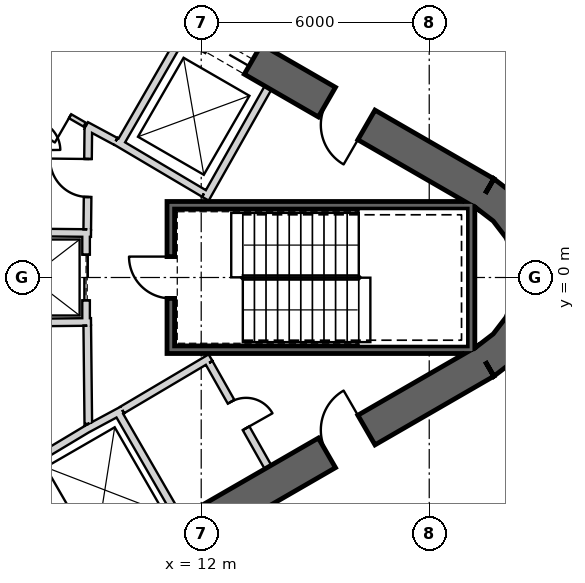
"""IFC4 building model, lengths in metres.
Left out: names, types, materials, properties, quantities, classifications, styles, units other than length and angle.
Written with IfcOpenShell. Run it as: python <this file> out.ifc"""

import sys

from ifc_helpers import new_model, si_unit, direction, frame, frame_2d, origin, place, context, subcontext, project, spatial, polyline, rectangle, outline, extrude, element, fill, save


model = new_model("IFC4")
c1 = context("Model", 3, precision=1e-05, world=origin(), true_north=direction((0.0, 1.0)))
c2 = subcontext(c1, "Body", "Model", "MODEL_VIEW")
j1 = project(units=[si_unit("LENGTHUNIT", "METRE"), si_unit("PLANEANGLEUNIT", "RADIAN")], contexts=[c1])
p1 = place(None, origin())
s1 = spatial("IfcSite", under=j1, at=p1, CompositionType="ELEMENT")
p2 = place(p1, origin())
s2 = spatial("IfcBuilding", under=s1, at=p2, CompositionType="ELEMENT")
p3 = place(p2, frame((0.0, 0.0, 241.2)))
s3 = spatial("IfcBuildingStorey", under=s2, at=p3, CompositionType="ELEMENT", Elevation=241.2)
p4 = place(p3, frame((19.475, 2.208, 0.0), z_axis=(0.0, 0.0, 1.0), x_axis=(-0.866028369851, 0.499994862586, 0.0)))
e1 = element("IfcWall", 1, at=p4, inside=s3, PredefinedType="SHEAR", context=c2, shape_type="SweptSolid", body=[
    extrude(rectangle(XDim=31.523, YDim=0.9, at=frame_2d((15.762, 0.0))), origin(), (0.0, 0.0, 1.0), 4.0),
])
p5 = place(p4, frame((7.062, 0.0, 0.0)))
e2 = element("IfcOpeningElement", 2, at=p5, cuts=e1, PredefinedType="OPENING", context=c2, shape_type="SweptSolid", body=[
    extrude(rectangle(XDim=1.2, YDim=2.4, at=frame_2d((0.6, 1.2))), frame((0.0, 0.46, 0.0), z_axis=(0.0, -1.0, 0.0), x_axis=(1.0, 0.0, 0.0)), (0.0, 0.0, 1.0), 0.92),
])
p6 = place(p4, frame((3.612, 0.0, 0.0)))
e3 = element("IfcOpeningElement", 3, at=p6, cuts=e1, PredefinedType="OPENING", context=c2, shape_type="SweptSolid", body=[
    extrude(rectangle(XDim=1.2, YDim=2.4, at=frame_2d((0.6, 1.2))), frame((0.0, 0.46, 0.0), z_axis=(0.0, -1.0, 0.0), x_axis=(1.0, 0.0, 0.0)), (0.0, 0.0, 1.0), 0.92),
])
p7 = place(p4, frame((26.712, 0.0, 0.0)))
e4 = element("IfcOpeningElement", 4, at=p7, cuts=e1, PredefinedType="OPENING", context=c2, shape_type="SweptSolid", body=[
    extrude(rectangle(XDim=1.2, YDim=2.4, at=frame_2d((0.6, 1.2))), frame((0.0, 0.46, 0.0), z_axis=(0.0, -1.0, 0.0), x_axis=(1.0, 0.0, 0.0)), (0.0, 0.0, 1.0), 0.92),
])
p8 = place(p3, frame((-7.825, -17.97, 0.0), z_axis=(0.0, 0.0, 1.0), x_axis=(0.866028369851, 0.499994862586, 0.0)))
e5 = element("IfcWall", 5, at=p8, inside=s3, PredefinedType="SHEAR", context=c2, shape_type="SweptSolid", body=[
    extrude(rectangle(XDim=31.523, YDim=0.9, at=frame_2d((15.762, 0.0))), origin(), (0.0, 0.0, 1.0), 4.0),
])
p9 = place(p8, frame((7.062, 0.0, 0.0)))
e6 = element("IfcOpeningElement", 6, at=p9, cuts=e5, PredefinedType="OPENING", context=c2, shape_type="SweptSolid", body=[
    extrude(rectangle(XDim=1.2, YDim=2.4, at=frame_2d((0.6, 1.2))), frame((0.0, 0.46, 0.0), z_axis=(0.0, -1.0, 0.0), x_axis=(1.0, 0.0, 0.0)), (0.0, 0.0, 1.0), 0.92),
])
p10 = place(p8, frame((9.762, 0.0, 0.0)))
e7 = element("IfcOpeningElement", 7, at=p10, cuts=e5, PredefinedType="OPENING", context=c2, shape_type="SweptSolid", body=[
    extrude(rectangle(XDim=1.2, YDim=2.4, at=frame_2d((0.6, 1.2))), frame((0.0, 0.46, 0.0), z_axis=(0.0, -1.0, 0.0), x_axis=(1.0, 0.0, 0.0)), (0.0, 0.0, 1.0), 0.92),
])
p11 = place(p8, frame((12.462, 0.0, 0.0)))
e8 = element("IfcOpeningElement", 8, at=p11, cuts=e5, PredefinedType="OPENING", context=c2, shape_type="SweptSolid", body=[
    extrude(rectangle(XDim=1.2, YDim=2.4, at=frame_2d((0.6, 1.2))), frame((0.0, 0.46, 0.0), z_axis=(0.0, -1.0, 0.0), x_axis=(1.0, 0.0, 0.0)), (0.0, 0.0, 1.0), 0.92),
])
p12 = place(p8, frame((15.162, 0.0, 0.0)))
e9 = element("IfcOpeningElement", 9, at=p12, cuts=e5, PredefinedType="OPENING", context=c2, shape_type="SweptSolid", body=[
    extrude(rectangle(XDim=1.2, YDim=2.4, at=frame_2d((0.6, 1.2))), frame((0.0, 0.46, 0.0), z_axis=(0.0, -1.0, 0.0), x_axis=(1.0, 0.0, 0.0)), (0.0, 0.0, 1.0), 0.92),
])
p13 = place(p8, frame((17.862, 0.0, 0.0)))
e10 = element("IfcOpeningElement", 10, at=p13, cuts=e5, PredefinedType="OPENING", context=c2, shape_type="SweptSolid", body=[
    extrude(rectangle(XDim=1.2, YDim=2.4, at=frame_2d((0.6, 1.2))), frame((0.0, 0.46, 0.0), z_axis=(0.0, -1.0, 0.0), x_axis=(1.0, 0.0, 0.0)), (0.0, 0.0, 1.0), 0.92),
])
p14 = place(p8, frame((20.562, 0.0, 0.0)))
e11 = element("IfcOpeningElement", 11, at=p14, cuts=e5, PredefinedType="OPENING", context=c2, shape_type="SweptSolid", body=[
    extrude(rectangle(XDim=1.2, YDim=2.4, at=frame_2d((0.6, 1.2))), frame((0.0, 0.46, 0.0), z_axis=(0.0, -1.0, 0.0), x_axis=(1.0, 0.0, 0.0)), (0.0, 0.0, 1.0), 0.92),
])
p15 = place(p8, frame((26.712, 0.0, 0.0)))
e12 = element("IfcOpeningElement", 12, at=p15, cuts=e5, PredefinedType="OPENING", context=c2, shape_type="SweptSolid", body=[
    extrude(rectangle(XDim=1.2, YDim=2.4, at=frame_2d((0.6, 1.2))), frame((0.0, 0.46, 0.0), z_axis=(0.0, -1.0, 0.0), x_axis=(1.0, 0.0, 0.0)), (0.0, 0.0, 1.0), 0.92),
])
p16 = place(p8, frame((3.612, 0.0, 0.0)))
e13 = element("IfcOpeningElement", 13, at=p16, cuts=e5, PredefinedType="OPENING", context=c2, shape_type="SweptSolid", body=[
    extrude(rectangle(XDim=1.2, YDim=2.4, at=frame_2d((0.6, 1.2))), frame((0.0, 0.46, 0.0), z_axis=(0.0, -1.0, 0.0), x_axis=(1.0, 0.0, 0.0)), (0.0, 0.0, 1.0), 0.92),
])
p17 = place(p3, origin())
e14 = element("IfcWall", 14, at=p17, inside=s3, PredefinedType="SHEAR", context=c2, shape_type="SweptSolid", body=[
    extrude(outline(polyline([(19.7, -2.598), (20.321, -2.121), (20.798, -1.5), (21.098, -0.777), (21.2, 0.0), (21.098, 0.777), (20.798, 1.5), (20.321, 2.121), (19.7, 2.598), (19.25, 1.819), (19.685, 1.485), (20.019, 1.05), (20.229, 0.543), (20.3, 0.0), (20.229, -0.543), (20.019, -1.05), (19.685, -1.485), (19.25, -1.819), (19.7, -2.598)])), origin(), (0.0, 0.0, 1.0), 4.0),
])
p18 = place(p3, frame((9.847, 3.495, 0.0), z_axis=(0.0, 0.0, 1.0), x_axis=(0.499984717929, 0.866034226713, 0.0)))
e15 = element("IfcWall", 15, at=p18, inside=s3, PredefinedType="PLUMBINGWALL", context=c2, shape_type="SweptSolid", body=[
    extrude(rectangle(XDim=3.25, YDim=0.2, at=frame_2d((1.625, 0.0))), origin(), (0.0, 0.0, 1.0), 3.7),
])
p19 = place(p3, frame((12.11, 2.073, 0.0), z_axis=(0.0, 0.0, 1.0), x_axis=(0.49196600604, 0.870614408852, 0.0)))
e16 = element("IfcWall", 16, at=p19, inside=s3, PredefinedType="PLUMBINGWALL", context=c2, shape_type="SweptSolid", body=[
    extrude(rectangle(XDim=3.35, YDim=0.2, at=frame_2d((1.675, 0.0))), origin(), (0.0, 0.0, 1.0), 3.7),
])
p20 = place(p3, frame((12.073, 2.211, 0.0), z_axis=(0.0, 0.0, 1.0), x_axis=(-0.860414880418, 0.509594185166, 0.0)))
e17 = element("IfcWall", 17, at=p20, inside=s3, PredefinedType="PLUMBINGWALL", context=c2, shape_type="SweptSolid", body=[
    extrude(rectangle(XDim=2.7, YDim=0.2, at=frame_2d((1.35, 0.0))), origin(), (0.0, 0.0, 1.0), 3.7),
])
p21 = place(p3, frame((9.795, -3.525, 0.0), z_axis=(0.0, 0.0, 1.0), x_axis=(0.499984717929, -0.866034226713, 0.0)))
e18 = element("IfcWall", 18, at=p21, inside=s3, PredefinedType="PLUMBINGWALL", context=c2, shape_type="SweptSolid", body=[
    extrude(rectangle(XDim=3.25, YDim=0.2, at=frame_2d((1.625, 0.0))), origin(), (0.0, 0.0, 1.0), 3.7),
])
p22 = place(p3, frame((8.974, -3.999, 0.0), z_axis=(0.0, 0.0, 1.0), x_axis=(0.880907015104, 0.473289373154, 0.0)))
e19 = element("IfcWall", 19, at=p22, inside=s3, PredefinedType="PLUMBINGWALL", context=c2, shape_type="SweptSolid", body=[
    extrude(rectangle(XDim=1.078, YDim=0.2, at=frame_2d((0.539, 0.0))), origin(), (0.0, 0.0, 1.0), 3.7),
])
p23 = place(p3, frame((7.497, -4.886, 0.0), z_axis=(0.0, 0.0, 1.0), x_axis=(0.857516281273, 0.51445682749, 0.0)))
e20 = element("IfcWall", 20, at=p23, inside=s3, PredefinedType="PLUMBINGWALL", context=c2, shape_type="SweptSolid", body=[
    extrude(rectangle(XDim=1.845, YDim=0.2, at=frame_2d((0.922, 0.0))), origin(), (0.0, 0.0, 1.0), 3.7),
])
p24 = place(p3, frame((19.2, 1.9, -0.3), z_axis=(0.0, 0.0, 1.0), x_axis=(-1.0, 0.0, 0.0)))
e21 = element("IfcWall", 21, at=p24, inside=s3, PredefinedType="SHEAR", context=c2, shape_type="SweptSolid", body=[
    extrude(rectangle(XDim=8.1, YDim=0.2, at=frame_2d((4.05, 0.0))), origin(), (0.0, 0.0, 1.0), 4.0),
])
p25 = place(p3, frame((19.1, -2.0, -0.3), z_axis=(0.0, 0.0, 1.0), x_axis=(0.0, 1.0, 0.0)))
e22 = element("IfcWall", 22, at=p25, inside=s3, PredefinedType="SHEAR", context=c2, shape_type="SweptSolid", body=[
    extrude(rectangle(XDim=3.8, YDim=0.2, at=frame_2d((1.9, 0.0))), origin(), (0.0, 0.0, 1.0), 4.0),
])
p26 = place(p3, frame((11.1, -1.9, -0.3), z_axis=(0.0, 0.0, 1.0), x_axis=(1.0, 0.0, 0.0)))
e23 = element("IfcWall", 23, at=p26, inside=s3, PredefinedType="SHEAR", context=c2, shape_type="SweptSolid", body=[
    extrude(rectangle(XDim=7.9, YDim=0.2, at=frame_2d((3.95, 0.0))), origin(), (0.0, 0.0, 1.0), 4.0),
])
p27 = place(p3, frame((11.2, -1.8, -0.3), z_axis=(0.0, 0.0, 1.0), x_axis=(0.0, 1.0, 0.0)))
e24 = element("IfcWall", 24, at=p27, inside=s3, PredefinedType="SHEAR", context=c2, shape_type="SweptSolid", body=[
    extrude(rectangle(XDim=3.6, YDim=0.2, at=frame_2d((1.8, 0.0))), origin(), (0.0, 0.0, 1.0), 4.0),
])
p28 = place(p27, frame((1.25, 0.0, 0.3)))
e25 = element("IfcOpeningElement", 25, at=p28, cuts=e24, PredefinedType="OPENING", context=c2, shape_type="SweptSolid", body=[
    extrude(rectangle(XDim=1.1, YDim=2.1, at=frame_2d((0.55, 1.05))), frame((0.0, 0.11, 0.0), z_axis=(0.0, -1.0, 0.0), x_axis=(1.0, 0.0, 0.0)), (0.0, 0.0, 1.0), 0.22),
])
p29 = place(p3, frame((8.97, 1.2, 0.0), z_axis=(0.0, 0.0, 1.0), x_axis=(0.0, -1.0, 0.0)))
e26 = element("IfcWall", 26, at=p29, inside=s3, PredefinedType="PLUMBINGWALL", context=c2, shape_type="SweptSolid", body=[
    extrude(rectangle(XDim=2.4, YDim=0.2, at=frame_2d((1.2, 0.0))), origin(), (0.0, 0.0, 1.0), 3.7),
])
p30 = place(p29, frame((0.6, 0.0, 0.0)))
e27 = element("IfcOpeningElement", 27, at=p30, cuts=e26, PredefinedType="OPENING", context=c2, shape_type="SweptSolid", body=[
    extrude(rectangle(XDim=1.2, YDim=2.4, at=frame_2d((0.6, 1.2))), frame((0.0, 0.11, 0.0), z_axis=(0.0, -1.0, 0.0), x_axis=(1.0, 0.0, 0.0)), (0.0, 0.0, 1.0), 0.22),
])
p31 = place(p3, frame((9.1, -1.169, 0.0), z_axis=(0.0, 0.0, 1.0), x_axis=(-0.999949988, -0.010001074852, 0.0)))
e28 = element("IfcWall", 28, at=p31, inside=s3, PredefinedType="PLUMBINGWALL", context=c2, shape_type="SweptSolid", body=[
    extrude(rectangle(XDim=3.1, YDim=0.2, at=frame_2d((1.55, 0.0))), origin(), (0.0, 0.0, 1.0), 3.7),
])
p32 = place(p3, frame((9.1, 1.169, 0.0), z_axis=(0.0, 0.0, 1.0), x_axis=(-0.99994990606, 0.010009264196, 0.0)))
e29 = element("IfcWall", 29, at=p32, inside=s3, PredefinedType="PLUMBINGWALL", context=c2, shape_type="SweptSolid", body=[
    extrude(rectangle(XDim=3.0, YDim=0.2, at=frame_2d((1.5, 0.0))), origin(), (0.0, 0.0, 1.0), 3.7),
])
p33 = place(p3, frame((8.974, 3.999, 0.0), z_axis=(0.0, 0.0, 1.0), x_axis=(0.880917147855, -0.473270513147, 0.0)))
e30 = element("IfcWall", 30, at=p33, inside=s3, PredefinedType="PARTITIONING", context=c2, shape_type="SweptSolid", body=[
    extrude(rectangle(XDim=0.878, YDim=0.2, at=frame_2d((0.439, 0.0))), origin(), (0.0, 0.0, 1.0), 3.7),
])
p34 = place(p3, frame((7.457, 4.875, 0.0), z_axis=(0.0, 0.0, 1.0), x_axis=(0.866027945518, -0.499995597562, 0.0)))
e31 = element("IfcWall", 31, at=p34, inside=s3, PredefinedType="PARTITIONING", context=c2, shape_type="SweptSolid", body=[
    extrude(rectangle(XDim=1.702, YDim=0.12, at=frame_2d((0.851, 0.0))), origin(), (0.0, 0.0, 1.0), 3.7),
])
p35 = place(p34, frame((0.461, 0.0, 0.0)))
e32 = element("IfcOpeningElement", 32, at=p35, cuts=e31, PredefinedType="OPENING", context=c2, shape_type="SweptSolid", body=[
    extrude(rectangle(XDim=0.8, YDim=2.1, at=frame_2d((0.4, 1.05))), frame((0.0, 0.07, 0.0), z_axis=(0.0, -1.0, 0.0), x_axis=(1.0, 0.0, 0.0)), (0.0, 0.0, 1.0), 0.14),
])
p36 = place(p3, frame((12.245, -2.109, 0.0), z_axis=(0.0, 0.0, 1.0), x_axis=(-0.860414880418, -0.509594185166, 0.0)))
e33 = element("IfcWall", 33, at=p36, inside=s3, PredefinedType="PARTITIONING", context=c2, shape_type="SweptSolid", body=[
    extrude(rectangle(XDim=2.7, YDim=0.2, at=frame_2d((1.35, 0.0))), origin(), (0.0, 0.0, 1.0), 3.7),
])
p37 = place(p3, frame((13.758, -4.99, 0.0), z_axis=(0.0, 0.0, 1.0), x_axis=(-0.491993409184, 0.87059892334, 0.0)))
e34 = element("IfcWall", 34, at=p37, inside=s3, PredefinedType="PARTITIONING", context=c2, shape_type="SweptSolid", body=[
    extrude(rectangle(XDim=3.15, YDim=0.2, at=frame_2d((1.575, 0.0))), origin(), (0.0, 0.0, 1.0), 3.7),
])
p38 = place(p37, frame((1.175, 0.0, 0.0)))
e35 = element("IfcOpeningElement", 35, at=p38, cuts=e34, PredefinedType="OPENING", context=c2, shape_type="SweptSolid", body=[
    extrude(rectangle(XDim=0.8, YDim=2.1, at=frame_2d((0.4, 1.05))), frame((0.0, 0.11, 0.0), z_axis=(0.0, -1.0, 0.0), x_axis=(1.0, 0.0, 0.0)), (0.0, 0.0, 1.0), 0.22),
])
p39 = place(p3, frame((9.029, -3.851, 0.0), z_axis=(0.0, 0.0, 1.0), x_axis=(-0.010784614026, 0.999941844359, 0.0)))
e36 = element("IfcWall", 36, at=p39, inside=s3, PredefinedType="PARTITIONING", context=c2, shape_type="SweptSolid", body=[
    extrude(rectangle(XDim=2.581, YDim=0.2, at=frame_2d((1.291, 0.0))), origin(), (0.0, 0.0, 1.0), 3.7),
])
p40 = place(p3, frame((9.001, 1.27, 0.0), z_axis=(0.0, 0.0, 1.0), x_axis=(0.010723968736, 0.999942496594, 0.0)))
e37 = element("IfcWall", 37, at=p40, inside=s3, PredefinedType="PARTITIONING", context=c2, shape_type="SweptSolid", body=[
    extrude(rectangle(XDim=2.709, YDim=0.2, at=frame_2d((1.354, 0.0))), origin(), (0.0, 0.0, 1.0), 3.7),
])
p41 = place(p40, frame((0.848, 0.0, 0.0)))
e38 = element("IfcOpeningElement", 38, at=p41, cuts=e37, PredefinedType="OPENING", context=c2, shape_type="SweptSolid", body=[
    extrude(rectangle(XDim=1.0, YDim=2.1, at=frame_2d((0.5, 1.05))), frame((0.0, 0.11, 0.0), z_axis=(0.0, -1.0, 0.0), x_axis=(1.0, 0.0, 0.0)), (0.0, 0.0, 1.0), 0.22),
])
p42 = place(p3, frame((21.229, 5.988, 0.0), z_axis=(0.0, 0.0, 1.0), x_axis=(-0.866024383922, 0.50000176645, 0.0)))
e39 = element("IfcWall", 39, at=p42, inside=s3, PredefinedType="PARTITIONING", context=c2, shape_type="SweptSolid", body=[
    extrude(rectangle(XDim=5.221, YDim=0.12, at=frame_2d((2.61, 0.0))), origin(), (0.0, 0.0, 1.0), 2.98),
])
p43 = place(p42, frame((2.16, 0.0, 0.0)))
e40 = element("IfcOpeningElement", 40, at=p43, cuts=e39, PredefinedType="OPENING", context=c2, shape_type="SweptSolid", body=[
    extrude(rectangle(XDim=0.9, YDim=2.1, at=frame_2d((0.45, 1.05))), frame((0.0, 0.07, 0.0), z_axis=(0.0, -1.0, 0.0), x_axis=(1.0, 0.0, 0.0)), (0.0, 0.0, 1.0), 0.14),
])
p44 = place(p28, origin())
e41 = element("IfcDoor", 41, at=p44, inside=s3, OperationType="SINGLE_SWING_RIGHT", PredefinedType="USERDEFINED", context=c2, shape_type="SweptSolid", body=[
    extrude(rectangle(XDim=1.1, YDim=2.1, at=frame_2d((0.55, 1.05))), frame((0.0, 0.025, 0.0), z_axis=(0.0, -1.0, 0.0), x_axis=(1.0, 0.0, 0.0)), (0.0, 0.0, 1.0), 0.05),
])
fill(e25, e41)
p45 = place(p41, origin())
e42 = element("IfcDoor", 42, at=p45, inside=s3, OperationType="SINGLE_SWING_LEFT", PredefinedType="USERDEFINED", context=c2, shape_type="SweptSolid", body=[
    extrude(rectangle(XDim=1.0, YDim=2.1, at=frame_2d((0.5, 1.05))), frame((0.0, 0.025, 0.0), z_axis=(0.0, -1.0, 0.0), x_axis=(1.0, 0.0, 0.0)), (0.0, 0.0, 1.0), 0.05),
])
fill(e38, e42)
p46 = place(p30, origin())
e43 = element("IfcDoor", 43, at=p46, inside=s3, OperationType="SLIDING_TO_LEFT", PredefinedType="USERDEFINED", context=c2, shape_type="SweptSolid", body=[
    extrude(rectangle(XDim=1.2, YDim=2.4, at=frame_2d((0.6, 1.2))), frame((0.0, 0.025, 0.0), z_axis=(0.0, -1.0, 0.0), x_axis=(1.0, 0.0, 0.0)), (0.0, 0.0, 1.0), 0.05),
])
fill(e27, e43)
p47 = place(p35, origin())
e44 = element("IfcDoor", 44, at=p47, inside=s3, OperationType="SINGLE_SWING_LEFT", PredefinedType="USERDEFINED", context=c2, shape_type="SweptSolid", body=[
    extrude(rectangle(XDim=0.8, YDim=2.1, at=frame_2d((0.4, 1.05))), frame((0.0, 0.025, 0.0), z_axis=(0.0, -1.0, 0.0), x_axis=(1.0, 0.0, 0.0)), (0.0, 0.0, 1.0), 0.05),
])
fill(e32, e44)
p48 = place(p38, origin())
e45 = element("IfcDoor", 45, at=p48, inside=s3, OperationType="SINGLE_SWING_RIGHT", PredefinedType="USERDEFINED", context=c2, shape_type="SweptSolid", body=[
    extrude(rectangle(XDim=0.8, YDim=2.1, at=frame_2d((0.4, 1.05))), frame((0.0, 0.025, 0.0), z_axis=(0.0, -1.0, 0.0), x_axis=(1.0, 0.0, 0.0)), (0.0, 0.0, 1.0), 0.05),
])
fill(e35, e45)
p49 = place(p5, origin())
e46 = element("IfcDoor", 46, at=p49, inside=s3, OperationType="SLIDING_TO_LEFT", PredefinedType="USERDEFINED", context=c2, shape_type="SweptSolid", body=[
    extrude(rectangle(XDim=1.2, YDim=2.4, at=frame_2d((0.6, 1.2))), frame((0.0, 0.025, 0.0), z_axis=(0.0, -1.0, 0.0), x_axis=(1.0, 0.0, 0.0)), (0.0, 0.0, 1.0), 0.05),
])
fill(e2, e46)
p50 = place(p15, origin())
e47 = element("IfcDoor", 47, at=p50, inside=s3, OperationType="SINGLE_SWING_LEFT", PredefinedType="USERDEFINED", context=c2, shape_type="SweptSolid", body=[
    extrude(rectangle(XDim=1.2, YDim=2.4, at=frame_2d((0.6, 1.2))), frame((0.0, 0.025, 0.0), z_axis=(0.0, -1.0, 0.0), x_axis=(1.0, 0.0, 0.0)), (0.0, 0.0, 1.0), 0.05),
])
fill(e12, e47)
p51 = place(p6, origin())
e48 = element("IfcDoor", 48, at=p51, inside=s3, OperationType="SINGLE_SWING_RIGHT", PredefinedType="USERDEFINED", context=c2, shape_type="SweptSolid", body=[
    extrude(rectangle(XDim=1.2, YDim=2.4, at=frame_2d((0.6, 1.2))), frame((0.0, 0.025, 0.0), z_axis=(0.0, -1.0, 0.0), x_axis=(1.0, 0.0, 0.0)), (0.0, 0.0, 1.0), 0.05),
])
fill(e3, e48)
save(model, sys.argv[1])
